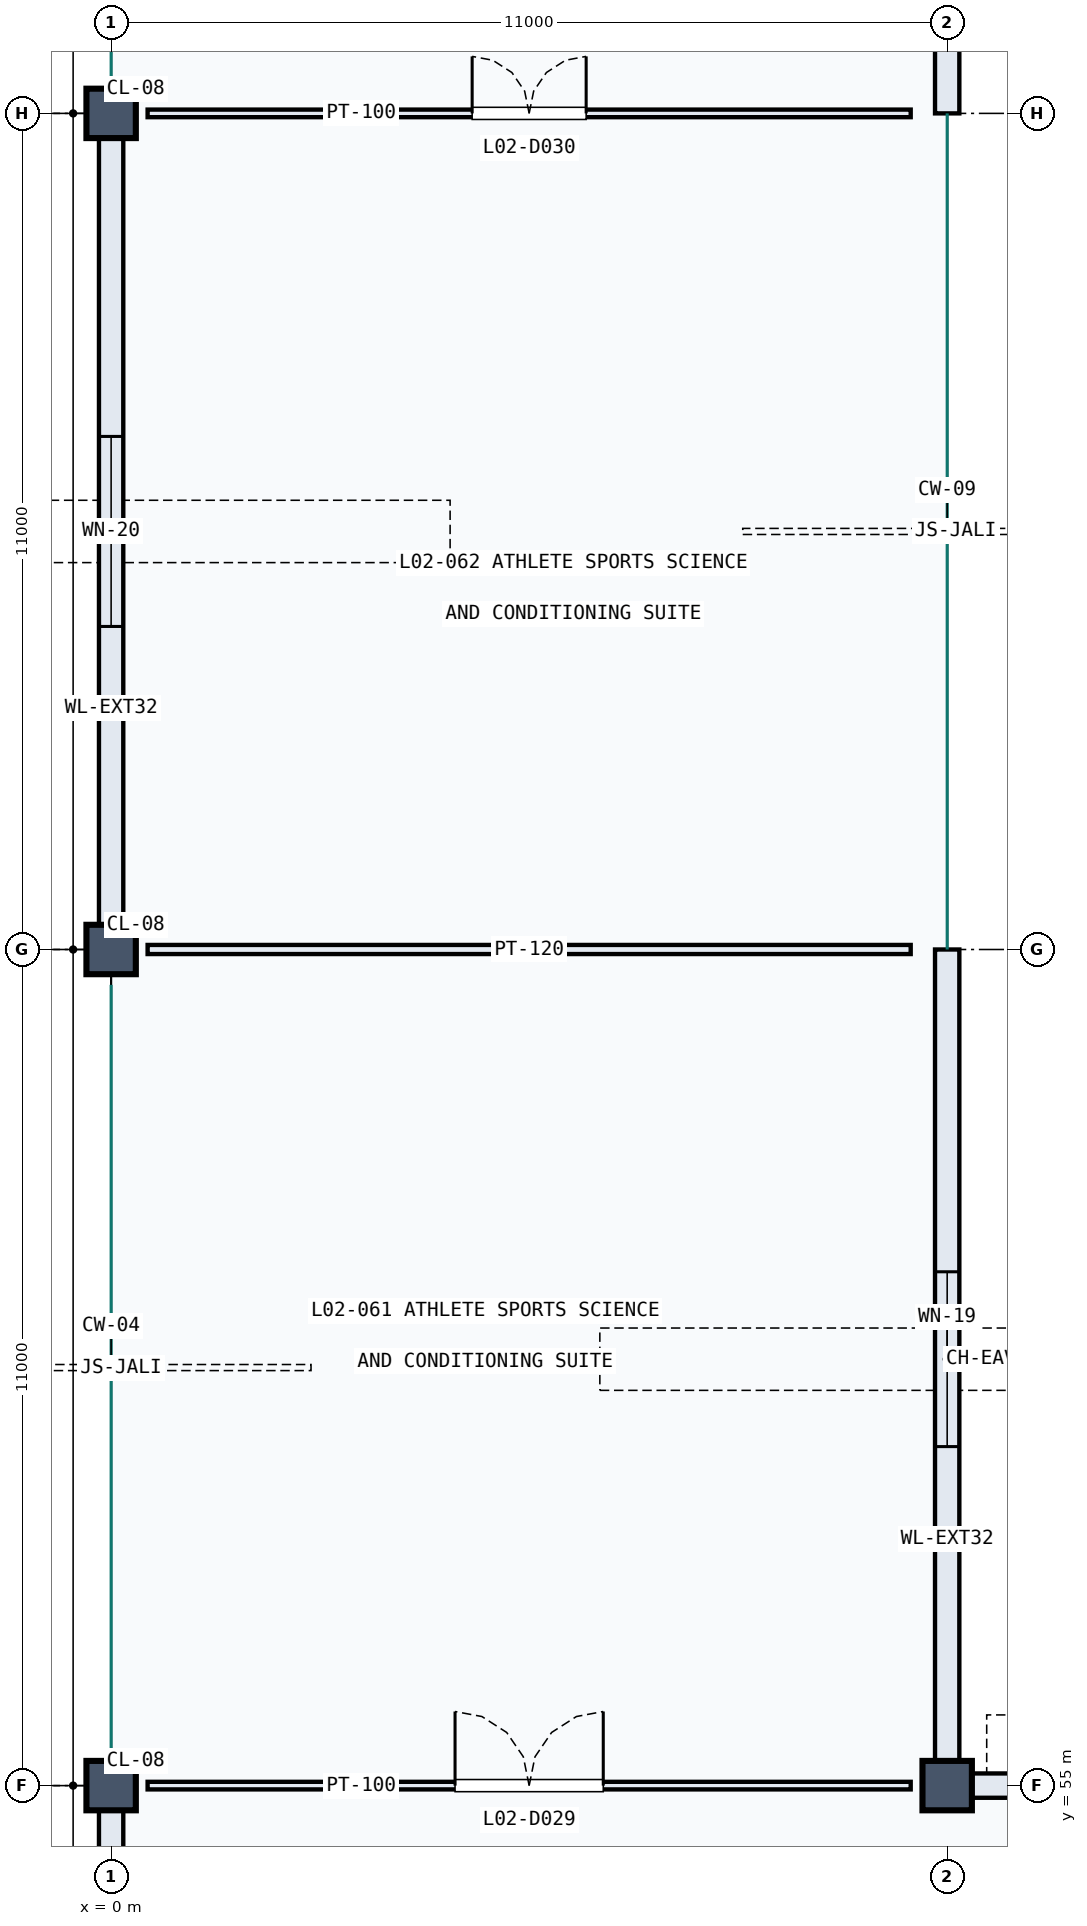
"""IFC4 building model, lengths in metres.
Left out: names, types, materials, properties, quantities, classifications, styles, units other than length and angle.
Written with IfcOpenShell. Run it as: python <this file> out.ifc"""

import sys

from ifc_helpers import new_model, si_unit, direction, frame, frame_2d, origin, origin_2d, place, context, subcontext, project, spatial, rectangle, extrude, element, fill, save


model = new_model("IFC4")
c1 = context("Model", 3, precision=1e-05, world=origin(), true_north=direction((0.0, 1.0)))
c2 = subcontext(c1, "Body", "Model", "MODEL_VIEW")
j1 = project(units=[si_unit("LENGTHUNIT", "METRE"), si_unit("PLANEANGLEUNIT", "RADIAN")], contexts=[c1])
p1 = place(None, origin())
s1 = spatial("IfcSite", under=j1, at=p1, CompositionType="ELEMENT")
p2 = place(p1, origin())
s2 = spatial("IfcBuilding", under=s1, at=p2, CompositionType="ELEMENT")
p3 = place(p2, frame((0.0, 0.0, 10.2)))
s3 = spatial("IfcBuildingStorey", under=s2, at=p3, CompositionType="ELEMENT", Elevation=10.2)
for number, where, z_axis, x_axis in (
    (1, (0.0, 55.0, 0.0), (0.0, 0.0, 1.0), (1.0, 0.0, 0.0)),
    (2, (0.0, 66.0, 0.0), (0.0, 0.0, 1.0), (1.0, 0.0, 0.0)),
    (3, (0.0, 77.0, 0.0), (0.0, 0.0, 1.0), (1.0, 0.0, 0.0)),
    (4, (11.0, 55.0, 0.0), (0.0, 0.0, 1.0), (1.0, 0.0, 0.0)),
):
    element("IfcColumn", number, at=place(p3, frame(where, z_axis=z_axis, x_axis=x_axis)), inside=s3, PredefinedType="COLUMN", context=c2, shape_type="SweptSolid", body=[
        extrude(rectangle(XDim=0.65, YDim=0.65, at=origin_2d()), origin(), (0.0, 0.0, 1.0), 4.5),
    ])
p4 = place(p3, frame((0.0, 44.22, 0.0), z_axis=(0.0, 0.0, 1.0), x_axis=(0.0, 1.0, 0.0)))
e5 = element("IfcWall", 5, at=p4, inside=s3, PredefinedType="SOLIDWALL", context=c2, shape_type="SweptSolid", body=[
    extrude(rectangle(XDim=10.56, YDim=0.32, at=frame_2d((5.28, 0.0))), origin(), (0.0, 0.0, 1.0), 3.405),
])
p5 = place(p4, frame((3.58, 0.0, 0.9)))
e6 = element("IfcOpeningElement", 6, at=p5, cuts=e5, PredefinedType="OPENING", context=c2, shape_type="SweptSolid", body=[
    extrude(rectangle(XDim=3.4, YDim=1.75, at=frame_2d((1.7, 0.875))), frame((0.0, 0.17, 0.0), z_axis=(0.0, -1.0, 0.0), x_axis=(1.0, 0.0, 0.0)), (0.0, 0.0, 1.0), 0.34),
])
p6 = place(p3, frame((11.0, 55.22, 0.0), z_axis=(0.0, 0.0, 1.0), x_axis=(0.0, 1.0, 0.0)))
e7 = element("IfcWall", 7, at=p6, inside=s3, PredefinedType="SOLIDWALL", context=c2, shape_type="SweptSolid", body=[
    extrude(rectangle(XDim=10.78, YDim=0.32, at=frame_2d((5.39, 0.0))), origin(), (0.0, 0.0, 1.0), 4.145),
])
p7 = place(p6, frame((4.24, 0.0, 0.85)))
e8 = element("IfcOpeningElement", 8, at=p7, cuts=e7, PredefinedType="OPENING", context=c2, shape_type="SweptSolid", body=[
    extrude(rectangle(XDim=2.3, YDim=2.05, at=frame_2d((1.15, 1.025))), frame((0.0, 0.17, 0.0), z_axis=(0.0, -1.0, 0.0), x_axis=(1.0, 0.0, 0.0)), (0.0, 0.0, 1.0), 0.34),
])
p8 = place(p3, frame((0.0, 66.22, 0.0), z_axis=(0.0, 0.0, 1.0), x_axis=(0.0, 1.0, 0.0)))
e9 = element("IfcWall", 9, at=p8, inside=s3, PredefinedType="SOLIDWALL", context=c2, shape_type="SweptSolid", body=[
    extrude(rectangle(XDim=10.56, YDim=0.32, at=frame_2d((5.28, 0.0))), origin(), (0.0, 0.0, 1.0), 4.145),
])
p9 = place(p8, frame((4.03, 0.0, 1.0)))
e10 = element("IfcOpeningElement", 10, at=p9, cuts=e9, PredefinedType="OPENING", context=c2, shape_type="SweptSolid", body=[
    extrude(rectangle(XDim=2.5, YDim=1.35, at=frame_2d((1.25, 0.675))), frame((0.0, 0.17, 0.0), z_axis=(0.0, -1.0, 0.0), x_axis=(1.0, 0.0, 0.0)), (0.0, 0.0, 1.0), 0.34),
])
p10 = place(p3, frame((11.0, 77.0, 0.0), z_axis=(0.0, 0.0, 1.0), x_axis=(0.0, 1.0, 0.0)))
e11 = element("IfcWall", 11, at=p10, inside=s3, PredefinedType="SOLIDWALL", context=c2, shape_type="SweptSolid", body=[
    extrude(rectangle(XDim=10.78, YDim=0.32, at=frame_2d((5.39, 0.0))), origin(), (0.0, 0.0, 1.0), 4.145),
])
p11 = place(p10, frame((1.845, 0.0, 1.0)))
e12 = element("IfcOpeningElement", 12, at=p11, cuts=e11, PredefinedType="OPENING", context=c2, shape_type="SweptSolid", body=[
    extrude(rectangle(XDim=1.7, YDim=1.3, at=frame_2d((0.85, 0.65))), frame((0.0, 0.17, 0.0), z_axis=(0.0, -1.0, 0.0), x_axis=(1.0, 0.0, 0.0)), (0.0, 0.0, 1.0), 0.34),
])
p12 = place(p10, frame((4.54, 0.0, 1.0)))
e13 = element("IfcOpeningElement", 13, at=p12, cuts=e11, PredefinedType="OPENING", context=c2, shape_type="SweptSolid", body=[
    extrude(rectangle(XDim=1.7, YDim=1.3, at=frame_2d((0.85, 0.65))), frame((0.0, 0.17, 0.0), z_axis=(0.0, -1.0, 0.0), x_axis=(1.0, 0.0, 0.0)), (0.0, 0.0, 1.0), 0.34),
])
p13 = place(p10, frame((7.235, 0.0, 1.0)))
e14 = element("IfcOpeningElement", 14, at=p13, cuts=e11, PredefinedType="OPENING", context=c2, shape_type="SweptSolid", body=[
    extrude(rectangle(XDim=1.7, YDim=1.3, at=frame_2d((0.85, 0.65))), frame((0.0, 0.17, 0.0), z_axis=(0.0, -1.0, 0.0), x_axis=(1.0, 0.0, 0.0)), (0.0, 0.0, 1.0), 0.34),
])
p14 = place(p3, frame((11.22, 55.0, 0.0), z_axis=(0.0, 0.0, 1.0), x_axis=(1.0, 0.0, 0.0)))
e15 = element("IfcWall", 15, at=p14, inside=s3, PredefinedType="SOLIDWALL", context=c2, shape_type="SweptSolid", body=[
    extrude(rectangle(XDim=10.56, YDim=0.32, at=frame_2d((5.28, 0.0))), origin(), (0.0, 0.0, 1.0), 4.145),
])
p15 = place(p14, frame((3.78, 0.0, 0.9)))
e16 = element("IfcOpeningElement", 16, at=p15, cuts=e15, PredefinedType="OPENING", context=c2, shape_type="SweptSolid", body=[
    extrude(rectangle(XDim=3.0, YDim=1.8, at=frame_2d((1.5, 0.9))), frame((0.0, 0.17, 0.0), z_axis=(0.0, -1.0, 0.0), x_axis=(1.0, 0.0, 0.0)), (0.0, 0.0, 1.0), 0.34),
])
p16 = place(p3, frame((0.48, 55.0, 0.0), z_axis=(0.0, 0.0, 1.0), x_axis=(1.0, 0.0, 0.0)))
e17 = element("IfcWall", 17, at=p16, inside=s3, PredefinedType="PARTITIONING", context=c2, shape_type="SweptSolid", body=[
    extrude(rectangle(XDim=10.04, YDim=0.1, at=frame_2d((5.02, 0.0))), origin(), (0.0, 0.0, 1.0), 4.14),
])
p17 = place(p16, frame((4.045, 0.0, 0.0)))
e18 = element("IfcOpeningElement", 18, at=p17, cuts=e17, PredefinedType="OPENING", context=c2, shape_type="SweptSolid", body=[
    extrude(rectangle(XDim=1.95, YDim=2.4, at=frame_2d((0.975, 1.2))), frame((0.0, 0.06, 0.0), z_axis=(0.0, -1.0, 0.0), x_axis=(1.0, 0.0, 0.0)), (0.0, 0.0, 1.0), 0.12),
])
p18 = place(p3, frame((0.48, 77.0, 0.0), z_axis=(0.0, 0.0, 1.0), x_axis=(1.0, 0.0, 0.0)))
e19 = element("IfcWall", 19, at=p18, inside=s3, PredefinedType="PARTITIONING", context=c2, shape_type="SweptSolid", body=[
    extrude(rectangle(XDim=10.04, YDim=0.1, at=frame_2d((5.02, 0.0))), origin(), (0.0, 0.0, 1.0), 4.14),
])
p19 = place(p18, frame((4.27, 0.0, 0.0)))
e20 = element("IfcOpeningElement", 20, at=p19, cuts=e19, PredefinedType="OPENING", context=c2, shape_type="SweptSolid", body=[
    extrude(rectangle(XDim=1.5, YDim=2.3, at=frame_2d((0.75, 1.15))), frame((0.0, 0.06, 0.0), z_axis=(0.0, -1.0, 0.0), x_axis=(1.0, 0.0, 0.0)), (0.0, 0.0, 1.0), 0.12),
])
p20 = place(p3, frame((0.48, 66.0, 0.0), z_axis=(0.0, 0.0, 1.0), x_axis=(1.0, 0.0, 0.0)))
e21 = element("IfcWall", 21, at=p20, inside=s3, PredefinedType="PARTITIONING", context=c2, shape_type="SweptSolid", body=[
    extrude(rectangle(XDim=10.04, YDim=0.12, at=frame_2d((5.02, 0.0))), origin(), (0.0, 0.0, 1.0), 4.14),
])
p21 = place(p7, origin())
e22 = element("IfcWindow", 22, at=p21, inside=s3, PartitioningType="SINGLE_PANEL", PredefinedType="WINDOW", context=c2, shape_type="SweptSolid", body=[
    extrude(rectangle(XDim=2.3, YDim=2.05, at=frame_2d((1.15, 1.025))), frame((0.0, 0.03, 0.0), z_axis=(0.0, -1.0, 0.0), x_axis=(1.0, 0.0, 0.0)), (0.0, 0.0, 1.0), 0.06),
])
fill(e8, e22)
p22 = place(p9, origin())
e23 = element("IfcWindow", 23, at=p22, inside=s3, PartitioningType="SINGLE_PANEL", PredefinedType="WINDOW", context=c2, shape_type="SweptSolid", body=[
    extrude(rectangle(XDim=2.5, YDim=1.35, at=frame_2d((1.25, 0.675))), frame((0.0, 0.03, 0.0), z_axis=(0.0, -1.0, 0.0), x_axis=(1.0, 0.0, 0.0)), (0.0, 0.0, 1.0), 0.06),
])
fill(e10, e23)
p23 = place(p17, origin())
e24 = element("IfcDoor", 24, at=p23, inside=s3, OperationType="DOUBLE_DOOR_SINGLE_SWING", PredefinedType="DOOR", context=c2, shape_type="SweptSolid", body=[
    extrude(rectangle(XDim=1.95, YDim=2.4, at=frame_2d((0.975, 1.2))), frame((0.0, 0.025, 0.0), z_axis=(0.0, -1.0, 0.0), x_axis=(1.0, 0.0, 0.0)), (0.0, 0.0, 1.0), 0.05),
])
fill(e18, e24)
p24 = place(p19, origin())
e25 = element("IfcDoor", 25, at=p24, inside=s3, OperationType="DOUBLE_DOOR_SINGLE_SWING", PredefinedType="DOOR", context=c2, shape_type="SweptSolid", body=[
    extrude(rectangle(XDim=1.5, YDim=2.3, at=frame_2d((0.75, 1.15))), frame((0.0, 0.025, 0.0), z_axis=(0.0, -1.0, 0.0), x_axis=(1.0, 0.0, 0.0)), (0.0, 0.0, 1.0), 0.05),
])
fill(e20, e25)
save(model, sys.argv[1])
